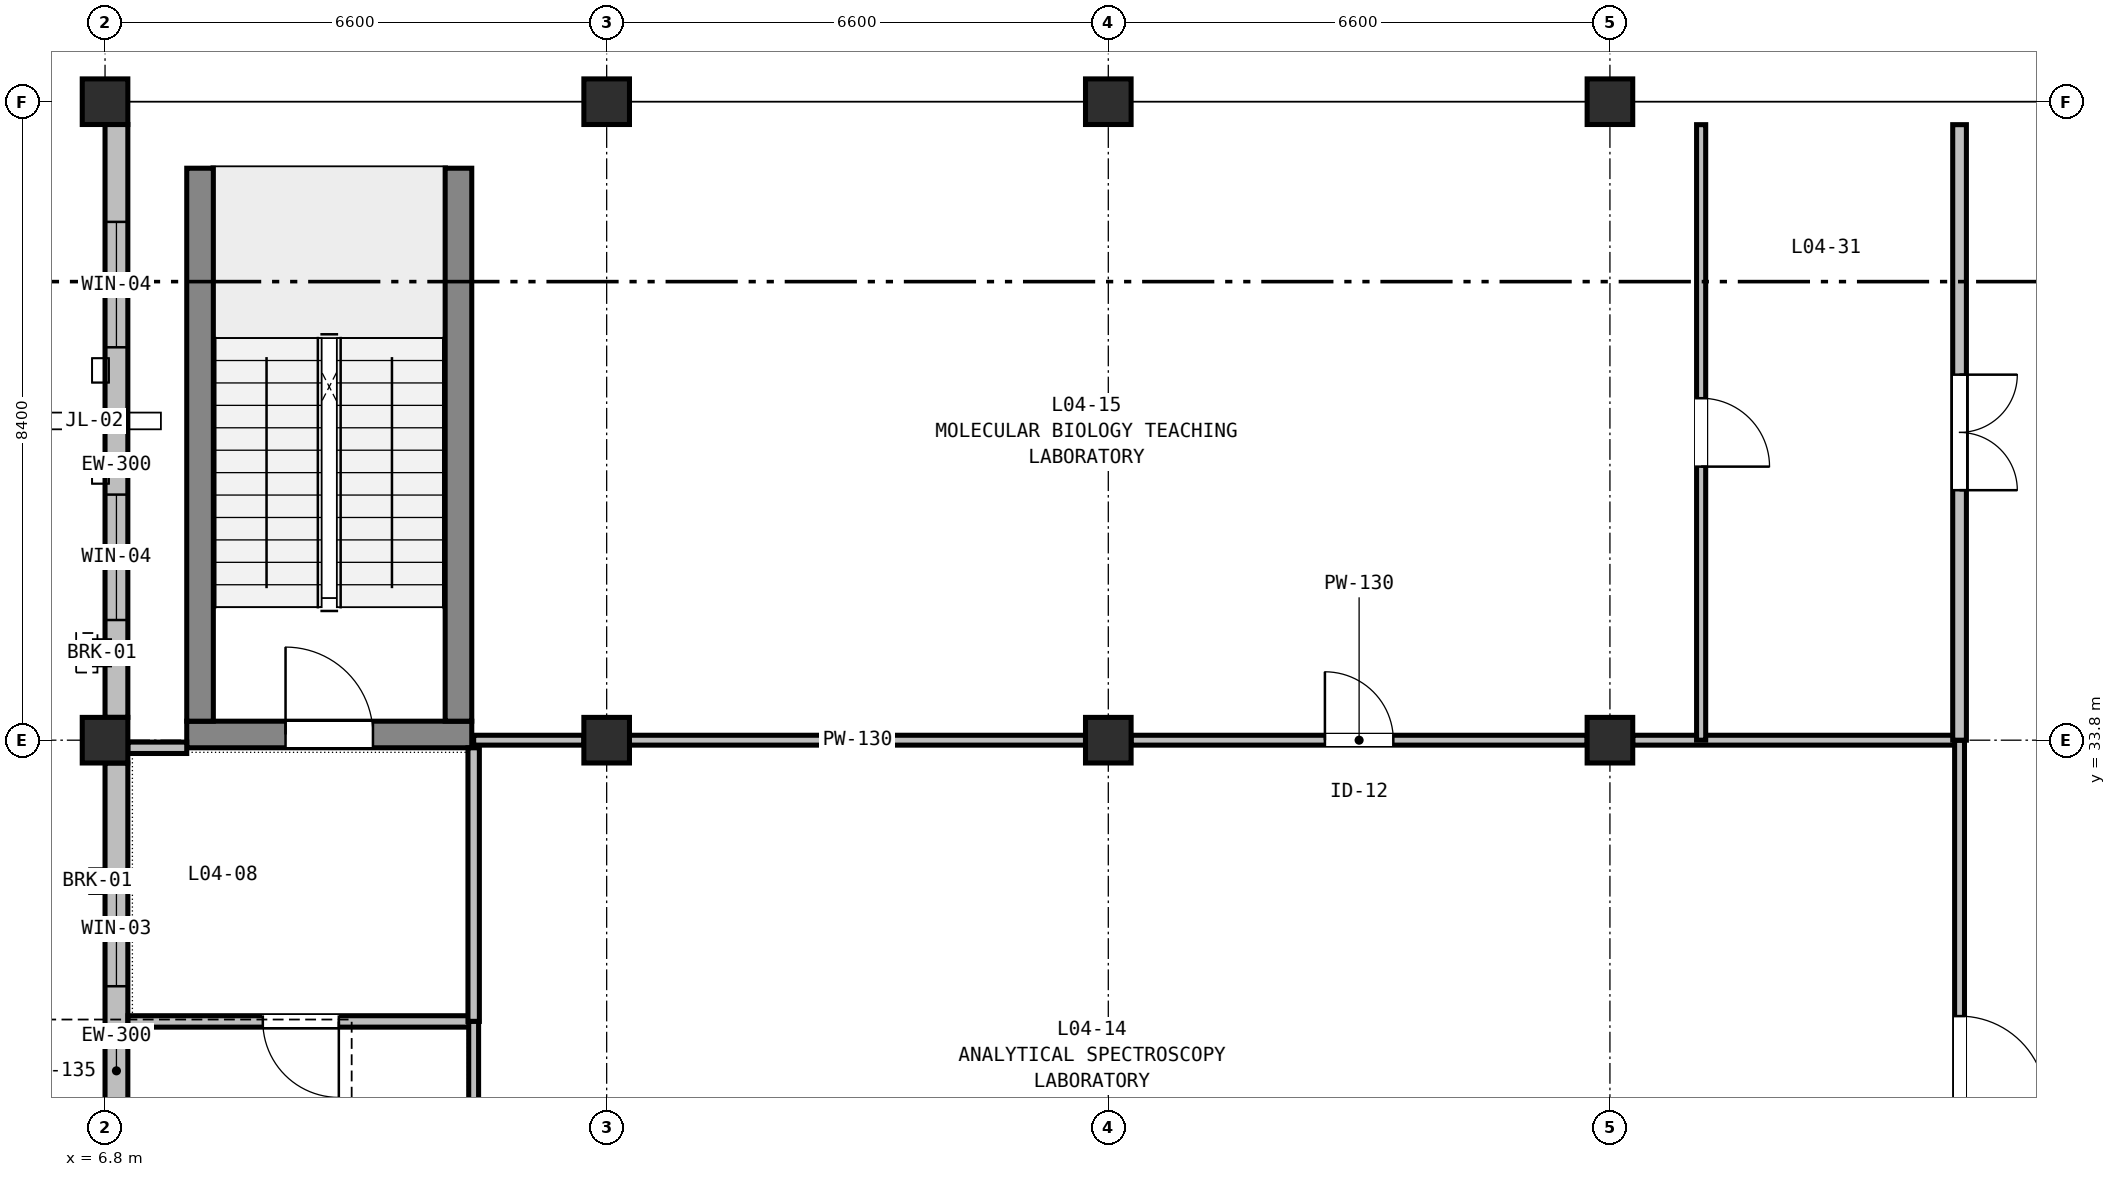
"""IFC4 building model, lengths in metres.
Left out: names, types, materials, properties, quantities, classifications, styles, units other than length and angle.
Written with IfcOpenShell. Run it as: python <this file> out.ifc"""

import sys

from ifc_helpers import new_model, si_unit, direction, frame, frame_2d, origin, origin_2d, place, context, subcontext, project, spatial, rectangle, extrude, element, fill, save


model = new_model("IFC4")
c1 = context("Model", 3, precision=1e-05, world=origin(), true_north=direction((0.0, 1.0)))
c2 = subcontext(c1, "Body", "Model", "MODEL_VIEW")
j1 = project(units=[si_unit("LENGTHUNIT", "METRE"), si_unit("PLANEANGLEUNIT", "RADIAN")], contexts=[c1])
p1 = place(None, origin())
s1 = spatial("IfcSite", under=j1, at=p1, CompositionType="ELEMENT")
p2 = place(p1, origin())
s2 = spatial("IfcBuilding", under=s1, at=p2, CompositionType="ELEMENT")
p3 = place(p2, frame((0.0, 0.0, 19.5)))
s3 = spatial("IfcBuildingStorey", under=s2, at=p3, CompositionType="ELEMENT", Elevation=19.5)
for number, where, z_axis, x_axis in (
    (1, (6.8, 33.8, 0.0), (0.0, 0.0, 1.0), (1.0, 0.0, 0.0)),
    (2, (6.8, 42.2, 0.0), (0.0, 0.0, 1.0), (1.0, 0.0, 0.0)),
    (3, (13.4, 33.8, 0.0), (0.0, 0.0, 1.0), (1.0, 0.0, 0.0)),
    (4, (13.4, 42.2, 0.0), (0.0, 0.0, 1.0), (1.0, 0.0, 0.0)),
    (5, (20.0, 33.8, 0.0), (0.0, 0.0, 1.0), (1.0, 0.0, 0.0)),
    (6, (20.0, 42.2, 0.0), (0.0, 0.0, 1.0), (1.0, 0.0, 0.0)),
    (7, (26.6, 33.8, 0.0), (0.0, 0.0, 1.0), (1.0, 0.0, 0.0)),
    (8, (26.6, 42.2, 0.0), (0.0, 0.0, 1.0), (1.0, 0.0, 0.0)),
):
    element("IfcColumn", number, at=place(p3, frame(where, z_axis=z_axis, x_axis=x_axis)), inside=s3, PredefinedType="COLUMN", context=c2, shape_type="SweptSolid", body=[
        extrude(rectangle(XDim=0.6, YDim=0.6, at=origin_2d()), origin(), (0.0, 0.0, 1.0), 4.5),
    ])
p4 = place(p3, frame((7.875, 33.875, 0.0), z_axis=(0.0, 0.0, 1.0), x_axis=(1.0, 0.0, 0.0)))
e9 = element("IfcWall", 9, at=p4, inside=s3, PredefinedType="SHEAR", context=c2, shape_type="SweptSolid", body=[
    extrude(rectangle(XDim=3.75, YDim=0.35, at=frame_2d((1.875, 0.0))), origin(), (0.0, 0.0, 1.0), 4.5),
])
p5 = place(p4, frame((1.3, 0.0, 0.0)))
e10 = element("IfcOpeningElement", 10, at=p5, cuts=e9, PredefinedType="OPENING", context=c2, shape_type="SweptSolid", body=[
    extrude(rectangle(XDim=1.15, YDim=2.15, at=frame_2d((0.575, 1.075))), frame((0.0, 0.185, 0.0), z_axis=(0.0, -1.0, 0.0), x_axis=(1.0, 0.0, 0.0)), (0.0, 0.0, 1.0), 0.37),
])
p6 = place(p3, frame((7.875, 41.5, 0.0), z_axis=(0.0, 0.0, 1.0), x_axis=(1.0, 0.0, 0.0)))
e11 = element("IfcWall", 11, at=p6, inside=s3, PredefinedType="SHEAR", context=c2, shape_type="SweptSolid", body=[
    extrude(rectangle(XDim=3.75, YDim=0.35, at=frame_2d((1.875, 0.0))), origin(), (0.0, 0.0, 1.0), 4.5),
])
for number, where, z_axis, x_axis in (
    (12, (8.05, 34.05, 0.0), (0.0, 0.0, 1.0), (0.0, 1.0, 0.0)),
    (13, (11.45, 34.05, 0.0), (0.0, 0.0, 1.0), (0.0, 1.0, 0.0)),
):
    element("IfcWall", number, at=place(p3, frame(where, z_axis=z_axis, x_axis=x_axis)), inside=s3, PredefinedType="SHEAR", context=c2, shape_type="SweptSolid", body=[
        extrude(rectangle(XDim=7.275, YDim=0.35, at=frame_2d((3.637, 0.0))), origin(), (0.0, 0.0, 1.0), 4.5),
    ])
p7 = place(p3, frame((6.95, 25.4, 0.0), z_axis=(0.0, 0.0, 1.0), x_axis=(0.0, 1.0, 0.0)))
e14 = element("IfcWall", 14, at=p7, inside=s3, PredefinedType="STANDARD", context=c2, shape_type="SweptSolid", body=[
    extrude(rectangle(XDim=8.1, YDim=0.3, at=frame_2d((4.05, 0.0))), origin(), (0.0, 0.0, 1.0), 3.885),
])
p8 = place(p7, frame((1.437, 0.0, 0.9)))
e15 = element("IfcOpeningElement", 15, at=p8, cuts=e14, PredefinedType="OPENING", context=c2, shape_type="SweptSolid", body=[
    extrude(rectangle(XDim=1.5, YDim=2.1, at=frame_2d((0.75, 1.05))), frame((0.0, 0.16, 0.0), z_axis=(0.0, -1.0, 0.0), x_axis=(1.0, 0.0, 0.0)), (0.0, 0.0, 1.0), 0.32),
])
p9 = place(p7, frame((5.163, 0.0, 0.9)))
e16 = element("IfcOpeningElement", 16, at=p9, cuts=e14, PredefinedType="OPENING", context=c2, shape_type="SweptSolid", body=[
    extrude(rectangle(XDim=1.5, YDim=2.1, at=frame_2d((0.75, 1.05))), frame((0.0, 0.16, 0.0), z_axis=(0.0, -1.0, 0.0), x_axis=(1.0, 0.0, 0.0)), (0.0, 0.0, 1.0), 0.32),
])
p10 = place(p3, frame((6.95, 34.1, 0.0), z_axis=(0.0, 0.0, 1.0), x_axis=(0.0, 1.0, 0.0)))
e17 = element("IfcWall", 17, at=p10, inside=s3, PredefinedType="STANDARD", context=c2, shape_type="SweptSolid", body=[
    extrude(rectangle(XDim=7.8, YDim=0.3, at=frame_2d((3.9, 0.0))), origin(), (0.0, 0.0, 1.0), 3.885),
])
p11 = place(p10, frame((1.281, 0.0, 0.9)))
e18 = element("IfcOpeningElement", 18, at=p11, cuts=e17, PredefinedType="OPENING", context=c2, shape_type="SweptSolid", body=[
    extrude(rectangle(XDim=1.65, YDim=2.1, at=frame_2d((0.825, 1.05))), frame((0.0, 0.16, 0.0), z_axis=(0.0, -1.0, 0.0), x_axis=(1.0, 0.0, 0.0)), (0.0, 0.0, 1.0), 0.32),
])
p12 = place(p10, frame((4.869, 0.0, 0.9)))
e19 = element("IfcOpeningElement", 19, at=p12, cuts=e17, PredefinedType="OPENING", context=c2, shape_type="SweptSolid", body=[
    extrude(rectangle(XDim=1.65, YDim=2.1, at=frame_2d((0.825, 1.05))), frame((0.0, 0.16, 0.0), z_axis=(0.0, -1.0, 0.0), x_axis=(1.0, 0.0, 0.0)), (0.0, 0.0, 1.0), 0.32),
])
p13 = place(p3, frame((6.8, 42.05, 0.0), z_axis=(0.0, 0.0, 1.0), x_axis=(1.0, 0.0, 0.0)))
e20 = element("IfcWall", 20, at=p13, inside=s3, PredefinedType="STANDARD", context=c2, shape_type="SweptSolid", body=[
    extrude(rectangle(XDim=6.6, YDim=0.3, at=frame_2d((3.3, 0.0))), origin(), (0.0, 0.0, 1.0), 3.735),
])
p14 = place(p13, frame((0.882, 0.0, 0.9)))
e21 = element("IfcOpeningElement", 21, at=p14, cuts=e20, PredefinedType="OPENING", context=c2, shape_type="SweptSolid", body=[
    extrude(rectangle(XDim=1.8, YDim=2.1, at=frame_2d((0.9, 1.05))), frame((0.0, 0.16, 0.0), z_axis=(0.0, -1.0, 0.0), x_axis=(1.0, 0.0, 0.0)), (0.0, 0.0, 1.0), 0.32),
])
p15 = place(p13, frame((3.918, 0.0, 0.9)))
e22 = element("IfcOpeningElement", 22, at=p15, cuts=e20, PredefinedType="OPENING", context=c2, shape_type="SweptSolid", body=[
    extrude(rectangle(XDim=1.8, YDim=2.1, at=frame_2d((0.9, 1.05))), frame((0.0, 0.16, 0.0), z_axis=(0.0, -1.0, 0.0), x_axis=(1.0, 0.0, 0.0)), (0.0, 0.0, 1.0), 0.32),
])
p16 = place(p3, frame((13.4, 42.05, 0.0), z_axis=(0.0, 0.0, 1.0), x_axis=(1.0, 0.0, 0.0)))
e23 = element("IfcWall", 23, at=p16, inside=s3, PredefinedType="STANDARD", context=c2, shape_type="SweptSolid", body=[
    extrude(rectangle(XDim=6.6, YDim=0.3, at=frame_2d((3.3, 0.0))), origin(), (0.0, 0.0, 1.0), 3.735),
])
p17 = place(p16, frame((0.807, 0.0, 0.9)))
e24 = element("IfcOpeningElement", 24, at=p17, cuts=e23, PredefinedType="OPENING", context=c2, shape_type="SweptSolid", body=[
    extrude(rectangle(XDim=1.95, YDim=2.1, at=frame_2d((0.975, 1.05))), frame((0.0, 0.16, 0.0), z_axis=(0.0, -1.0, 0.0), x_axis=(1.0, 0.0, 0.0)), (0.0, 0.0, 1.0), 0.32),
])
p18 = place(p16, frame((3.843, 0.0, 0.9)))
e25 = element("IfcOpeningElement", 25, at=p18, cuts=e23, PredefinedType="OPENING", context=c2, shape_type="SweptSolid", body=[
    extrude(rectangle(XDim=1.95, YDim=2.1, at=frame_2d((0.975, 1.05))), frame((0.0, 0.16, 0.0), z_axis=(0.0, -1.0, 0.0), x_axis=(1.0, 0.0, 0.0)), (0.0, 0.0, 1.0), 0.32),
])
p19 = place(p3, frame((20.0, 42.05, 0.0), z_axis=(0.0, 0.0, 1.0), x_axis=(1.0, 0.0, 0.0)))
e26 = element("IfcWall", 26, at=p19, inside=s3, PredefinedType="STANDARD", context=c2, shape_type="SweptSolid", body=[
    extrude(rectangle(XDim=6.6, YDim=0.3, at=frame_2d((3.3, 0.0))), origin(), (0.0, 0.0, 1.0), 3.735),
])
p20 = place(p3, frame((26.6, 42.05, 0.0), z_axis=(0.0, 0.0, 1.0), x_axis=(1.0, 0.0, 0.0)))
e27 = element("IfcWall", 27, at=p20, inside=s3, PredefinedType="STANDARD", context=c2, shape_type="SweptSolid", body=[
    extrude(rectangle(XDim=6.6, YDim=0.3, at=frame_2d((3.3, 0.0))), origin(), (0.0, 0.0, 1.0), 3.735),
])
p21 = place(p20, frame((1.44, 0.0, 0.9)))
e28 = element("IfcOpeningElement", 28, at=p21, cuts=e27, PredefinedType="OPENING", context=c2, shape_type="SweptSolid", body=[
    extrude(rectangle(XDim=2.25, YDim=2.1, at=frame_2d((1.125, 1.05))), frame((0.0, 0.16, 0.0), z_axis=(0.0, -1.0, 0.0), x_axis=(1.0, 0.0, 0.0)), (0.0, 0.0, 1.0), 0.32),
])
p22 = place(p3, frame((11.65, 30.1, 0.0), z_axis=(0.0, 0.0, 1.0), x_axis=(-1.0, 0.0, 0.0)))
e29 = element("IfcWall", 29, at=p22, inside=s3, PredefinedType="PARTITIONING", context=c2, shape_type="SweptSolid", body=[
    extrude(rectangle(XDim=4.548, YDim=0.15, at=frame_2d((2.274, 0.0))), origin(), (0.0, 0.0, 1.0), 3.985),
])
p23 = place(p22, frame((1.774, 0.0, 0.0)))
e30 = element("IfcOpeningElement", 30, at=p23, cuts=e29, PredefinedType="OPENING", context=c2, shape_type="SweptSolid", body=[
    extrude(rectangle(XDim=1.0, YDim=2.1, at=frame_2d((0.5, 1.05))), frame((0.0, 0.085, 0.0), z_axis=(0.0, -1.0, 0.0), x_axis=(1.0, 0.0, 0.0)), (0.0, 0.0, 1.0), 0.17),
])
p24 = place(p3, frame((7.1, 33.7, 0.0), z_axis=(0.0, 0.0, 1.0), x_axis=(1.0, 0.0, 0.0)))
e31 = element("IfcWall", 31, at=p24, inside=s3, PredefinedType="PARTITIONING", context=c2, shape_type="SweptSolid", body=[
    extrude(rectangle(XDim=0.775, YDim=0.15, at=frame_2d((0.387, 0.0))), origin(), (0.0, 0.0, 1.0), 3.885),
])
p25 = place(p3, frame((11.65, 33.7, 0.0), z_axis=(0.0, 0.0, 1.0), x_axis=(0.0, -1.0, 0.0)))
e32 = element("IfcWall", 32, at=p25, inside=s3, PredefinedType="PARTITIONING", context=c2, shape_type="SweptSolid", body=[
    extrude(rectangle(XDim=3.6, YDim=0.15, at=frame_2d((1.8, 0.0))), origin(), (0.0, 0.0, 1.0), 3.885),
])
p26 = place(p3, frame((11.65, 33.8, 0.0), z_axis=(0.0, 0.0, 1.0), x_axis=(1.0, 0.0, 0.0)))
e33 = element("IfcWall", 33, at=p26, inside=s3, PredefinedType="PARTITIONING", context=c2, shape_type="SweptSolid", body=[
    extrude(rectangle(XDim=1.45, YDim=0.13, at=frame_2d((0.725, 0.0))), origin(), (0.0, 0.0, 1.0), 3.885),
])
p27 = place(p3, frame((13.7, 33.8, 0.0), z_axis=(0.0, 0.0, 1.0), x_axis=(1.0, 0.0, 0.0)))
e34 = element("IfcWall", 34, at=p27, inside=s3, PredefinedType="PARTITIONING", context=c2, shape_type="SweptSolid", body=[
    extrude(rectangle(XDim=6.0, YDim=0.13, at=frame_2d((3.0, 0.0))), origin(), (0.0, 0.0, 1.0), 3.885),
])
p28 = place(p3, frame((20.3, 33.8, 0.0), z_axis=(0.0, 0.0, 1.0), x_axis=(1.0, 0.0, 0.0)))
e35 = element("IfcWall", 35, at=p28, inside=s3, PredefinedType="PARTITIONING", context=c2, shape_type="SweptSolid", body=[
    extrude(rectangle(XDim=6.0, YDim=0.13, at=frame_2d((3.0, 0.0))), origin(), (0.0, 0.0, 1.0), 3.885),
])
p29 = place(p28, frame((2.55, 0.0, 0.0)))
e36 = element("IfcOpeningElement", 36, at=p29, cuts=e35, PredefinedType="OPENING", context=c2, shape_type="SweptSolid", body=[
    extrude(rectangle(XDim=0.9, YDim=2.1, at=frame_2d((0.45, 1.05))), frame((0.0, 0.075, 0.0), z_axis=(0.0, -1.0, 0.0), x_axis=(1.0, 0.0, 0.0)), (0.0, 0.0, 1.0), 0.15),
])
p30 = place(p3, frame((26.9, 33.8, 0.0), z_axis=(0.0, 0.0, 1.0), x_axis=(1.0, 0.0, 0.0)))
e37 = element("IfcWall", 37, at=p30, inside=s3, PredefinedType="PARTITIONING", context=c2, shape_type="SweptSolid", body=[
    extrude(rectangle(XDim=4.3, YDim=0.13, at=frame_2d((2.15, 0.0))), origin(), (0.0, 0.0, 1.0), 3.885),
])
p31 = place(p3, frame((31.2, 33.8, 0.0), z_axis=(0.0, 0.0, 1.0), x_axis=(0.0, -1.0, 0.0)))
e38 = element("IfcWall", 38, at=p31, inside=s3, PredefinedType="PARTITIONING", context=c2, shape_type="SweptSolid", body=[
    extrude(rectangle(XDim=8.4, YDim=0.13, at=frame_2d((4.2, 0.0))), origin(), (0.0, 0.0, 1.0), 3.885),
])
p32 = place(p31, frame((3.63, 0.0, 0.0)))
e39 = element("IfcOpeningElement", 39, at=p32, cuts=e38, PredefinedType="OPENING", context=c2, shape_type="SweptSolid", body=[
    extrude(rectangle(XDim=1.14, YDim=2.06, at=frame_2d((0.57, 1.03))), frame((0.0, 0.075, 0.0), z_axis=(0.0, -1.0, 0.0), x_axis=(1.0, 0.0, 0.0)), (0.0, 0.0, 1.0), 0.15),
])
p33 = place(p3, frame((11.65, 25.4, 0.0), z_axis=(0.0, 0.0, 1.0), x_axis=(0.0, 1.0, 0.0)))
e40 = element("IfcWall", 40, at=p33, inside=s3, PredefinedType="PARTITIONING", context=c2, shape_type="SweptSolid", body=[
    extrude(rectangle(XDim=4.7, YDim=0.13, at=frame_2d((2.35, 0.0))), origin(), (0.0, 0.0, 1.0), 3.885),
])
p34 = place(p3, frame((27.8, 41.898, 0.0), z_axis=(0.0, 0.0, 1.0), x_axis=(0.0, -1.0, 0.0)))
e41 = element("IfcWall", 41, at=p34, inside=s3, PredefinedType="PARTITIONING", context=c2, shape_type="SweptSolid", body=[
    extrude(rectangle(XDim=8.098, YDim=0.12, at=frame_2d((4.049, 0.0))), origin(), (0.0, 0.0, 1.0), 3.885),
])
p35 = place(p34, frame((3.599, 0.0, 0.0)))
e42 = element("IfcOpeningElement", 42, at=p35, cuts=e41, PredefinedType="OPENING", context=c2, shape_type="SweptSolid", body=[
    extrude(rectangle(XDim=0.9, YDim=2.1, at=frame_2d((0.45, 1.05))), frame((0.0, 0.07, 0.0), z_axis=(0.0, -1.0, 0.0), x_axis=(1.0, 0.0, 0.0)), (0.0, 0.0, 1.0), 0.14),
])
p36 = place(p3, frame((31.2, 41.898, 0.0), z_axis=(0.0, 0.0, 1.0), x_axis=(0.0, -1.0, 0.0)))
e43 = element("IfcWall", 43, at=p36, inside=s3, PredefinedType="PARTITIONING", context=c2, shape_type="SweptSolid", body=[
    extrude(rectangle(XDim=8.098, YDim=0.18, at=frame_2d((4.049, 0.0))), origin(), (0.0, 0.0, 1.0), 3.885),
])
p37 = place(p36, frame((3.289, 0.0, 0.0)))
e44 = element("IfcOpeningElement", 44, at=p37, cuts=e43, PredefinedType="OPENING", context=c2, shape_type="SweptSolid", body=[
    extrude(rectangle(XDim=1.52, YDim=2.14, at=frame_2d((0.76, 1.07))), frame((0.0, 0.1, 0.0), z_axis=(0.0, -1.0, 0.0), x_axis=(1.0, 0.0, 0.0)), (0.0, 0.0, 1.0), 0.2),
])
p38 = place(p9, origin())
e45 = element("IfcWindow", 45, at=p38, inside=s3, PartitioningType="SINGLE_PANEL", PredefinedType="WINDOW", context=c2, shape_type="SweptSolid", body=[
    extrude(rectangle(XDim=1.5, YDim=2.1, at=frame_2d((0.75, 1.05))), frame((0.0, 0.03, 0.0), z_axis=(0.0, -1.0, 0.0), x_axis=(1.0, 0.0, 0.0)), (0.0, 0.0, 1.0), 0.06),
])
fill(e16, e45)
p39 = place(p11, origin())
e46 = element("IfcWindow", 46, at=p39, inside=s3, PartitioningType="SINGLE_PANEL", PredefinedType="WINDOW", context=c2, shape_type="SweptSolid", body=[
    extrude(rectangle(XDim=1.65, YDim=2.1, at=frame_2d((0.825, 1.05))), frame((0.0, 0.03, 0.0), z_axis=(0.0, -1.0, 0.0), x_axis=(1.0, 0.0, 0.0)), (0.0, 0.0, 1.0), 0.06),
])
fill(e18, e46)
p40 = place(p12, origin())
e47 = element("IfcWindow", 47, at=p40, inside=s3, PartitioningType="SINGLE_PANEL", PredefinedType="WINDOW", context=c2, shape_type="SweptSolid", body=[
    extrude(rectangle(XDim=1.65, YDim=2.1, at=frame_2d((0.825, 1.05))), frame((0.0, 0.03, 0.0), z_axis=(0.0, -1.0, 0.0), x_axis=(1.0, 0.0, 0.0)), (0.0, 0.0, 1.0), 0.06),
])
fill(e19, e47)
p41 = place(p14, origin())
e48 = element("IfcWindow", 48, at=p41, inside=s3, PartitioningType="SINGLE_PANEL", PredefinedType="WINDOW", context=c2, shape_type="SweptSolid", body=[
    extrude(rectangle(XDim=1.8, YDim=2.1, at=frame_2d((0.9, 1.05))), frame((0.0, 0.03, 0.0), z_axis=(0.0, -1.0, 0.0), x_axis=(1.0, 0.0, 0.0)), (0.0, 0.0, 1.0), 0.06),
])
fill(e21, e48)
p42 = place(p15, origin())
e49 = element("IfcWindow", 49, at=p42, inside=s3, PartitioningType="SINGLE_PANEL", PredefinedType="WINDOW", context=c2, shape_type="SweptSolid", body=[
    extrude(rectangle(XDim=1.8, YDim=2.1, at=frame_2d((0.9, 1.05))), frame((0.0, 0.03, 0.0), z_axis=(0.0, -1.0, 0.0), x_axis=(1.0, 0.0, 0.0)), (0.0, 0.0, 1.0), 0.06),
])
fill(e22, e49)
p43 = place(p17, origin())
e50 = element("IfcWindow", 50, at=p43, inside=s3, PartitioningType="SINGLE_PANEL", PredefinedType="WINDOW", context=c2, shape_type="SweptSolid", body=[
    extrude(rectangle(XDim=1.95, YDim=2.1, at=frame_2d((0.975, 1.05))), frame((0.0, 0.03, 0.0), z_axis=(0.0, -1.0, 0.0), x_axis=(1.0, 0.0, 0.0)), (0.0, 0.0, 1.0), 0.06),
])
fill(e24, e50)
p44 = place(p18, origin())
e51 = element("IfcWindow", 51, at=p44, inside=s3, PartitioningType="SINGLE_PANEL", PredefinedType="WINDOW", context=c2, shape_type="SweptSolid", body=[
    extrude(rectangle(XDim=1.95, YDim=2.1, at=frame_2d((0.975, 1.05))), frame((0.0, 0.03, 0.0), z_axis=(0.0, -1.0, 0.0), x_axis=(1.0, 0.0, 0.0)), (0.0, 0.0, 1.0), 0.06),
])
fill(e25, e51)
p45 = place(p21, origin())
e52 = element("IfcWindow", 52, at=p45, inside=s3, PartitioningType="SINGLE_PANEL", PredefinedType="WINDOW", context=c2, shape_type="SweptSolid", body=[
    extrude(rectangle(XDim=2.25, YDim=2.1, at=frame_2d((1.125, 1.05))), frame((0.0, 0.03, 0.0), z_axis=(0.0, -1.0, 0.0), x_axis=(1.0, 0.0, 0.0)), (0.0, 0.0, 1.0), 0.06),
])
fill(e28, e52)
p46 = place(p5, origin())
e53 = element("IfcDoor", 53, at=p46, inside=s3, OperationType="SINGLE_SWING_LEFT", PredefinedType="DOOR", context=c2, shape_type="SweptSolid", body=[
    extrude(rectangle(XDim=1.15, YDim=2.15, at=frame_2d((0.575, 1.075))), frame((0.0, 0.025, 0.0), z_axis=(0.0, -1.0, 0.0), x_axis=(1.0, 0.0, 0.0)), (0.0, 0.0, 1.0), 0.05),
])
fill(e10, e53)
p47 = place(p23, origin())
e54 = element("IfcDoor", 54, at=p47, inside=s3, OperationType="SINGLE_SWING_LEFT", PredefinedType="DOOR", context=c2, shape_type="SweptSolid", body=[
    extrude(rectangle(XDim=1.0, YDim=2.1, at=frame_2d((0.5, 1.05))), frame((0.0, 0.025, 0.0), z_axis=(0.0, -1.0, 0.0), x_axis=(1.0, 0.0, 0.0)), (0.0, 0.0, 1.0), 0.05),
])
fill(e30, e54)
p48 = place(p32, origin())
e55 = element("IfcDoor", 55, at=p48, inside=s3, OperationType="SINGLE_SWING_RIGHT", PredefinedType="DOOR", context=c2, shape_type="SweptSolid", body=[
    extrude(rectangle(XDim=1.14, YDim=2.06, at=frame_2d((0.57, 1.03))), frame((0.0, 0.025, 0.0), z_axis=(0.0, -1.0, 0.0), x_axis=(1.0, 0.0, 0.0)), (0.0, 0.0, 1.0), 0.05),
])
fill(e39, e55)
p49 = place(p35, origin())
e56 = element("IfcDoor", 56, at=p49, inside=s3, OperationType="SINGLE_SWING_RIGHT", PredefinedType="DOOR", context=c2, shape_type="SweptSolid", body=[
    extrude(rectangle(XDim=0.9, YDim=2.1, at=frame_2d((0.45, 1.05))), frame((0.0, 0.025, 0.0), z_axis=(0.0, -1.0, 0.0), x_axis=(1.0, 0.0, 0.0)), (0.0, 0.0, 1.0), 0.05),
])
fill(e42, e56)
p50 = place(p29, origin())
e57 = element("IfcDoor", 57, at=p50, inside=s3, OperationType="SINGLE_SWING_LEFT", PredefinedType="DOOR", context=c2, shape_type="SweptSolid", body=[
    extrude(rectangle(XDim=0.9, YDim=2.1, at=frame_2d((0.45, 1.05))), frame((0.0, 0.025, 0.0), z_axis=(0.0, -1.0, 0.0), x_axis=(1.0, 0.0, 0.0)), (0.0, 0.0, 1.0), 0.05),
])
fill(e36, e57)
p51 = place(p37, origin())
e58 = element("IfcDoor", 58, at=p51, inside=s3, OperationType="DOUBLE_DOOR_SINGLE_SWING", PredefinedType="DOOR", context=c2, shape_type="SweptSolid", body=[
    extrude(rectangle(XDim=1.52, YDim=2.14, at=frame_2d((0.76, 1.07))), frame((0.0, 0.025, 0.0), z_axis=(0.0, -1.0, 0.0), x_axis=(1.0, 0.0, 0.0)), (0.0, 0.0, 1.0), 0.05),
])
fill(e44, e58)
save(model, sys.argv[1])
